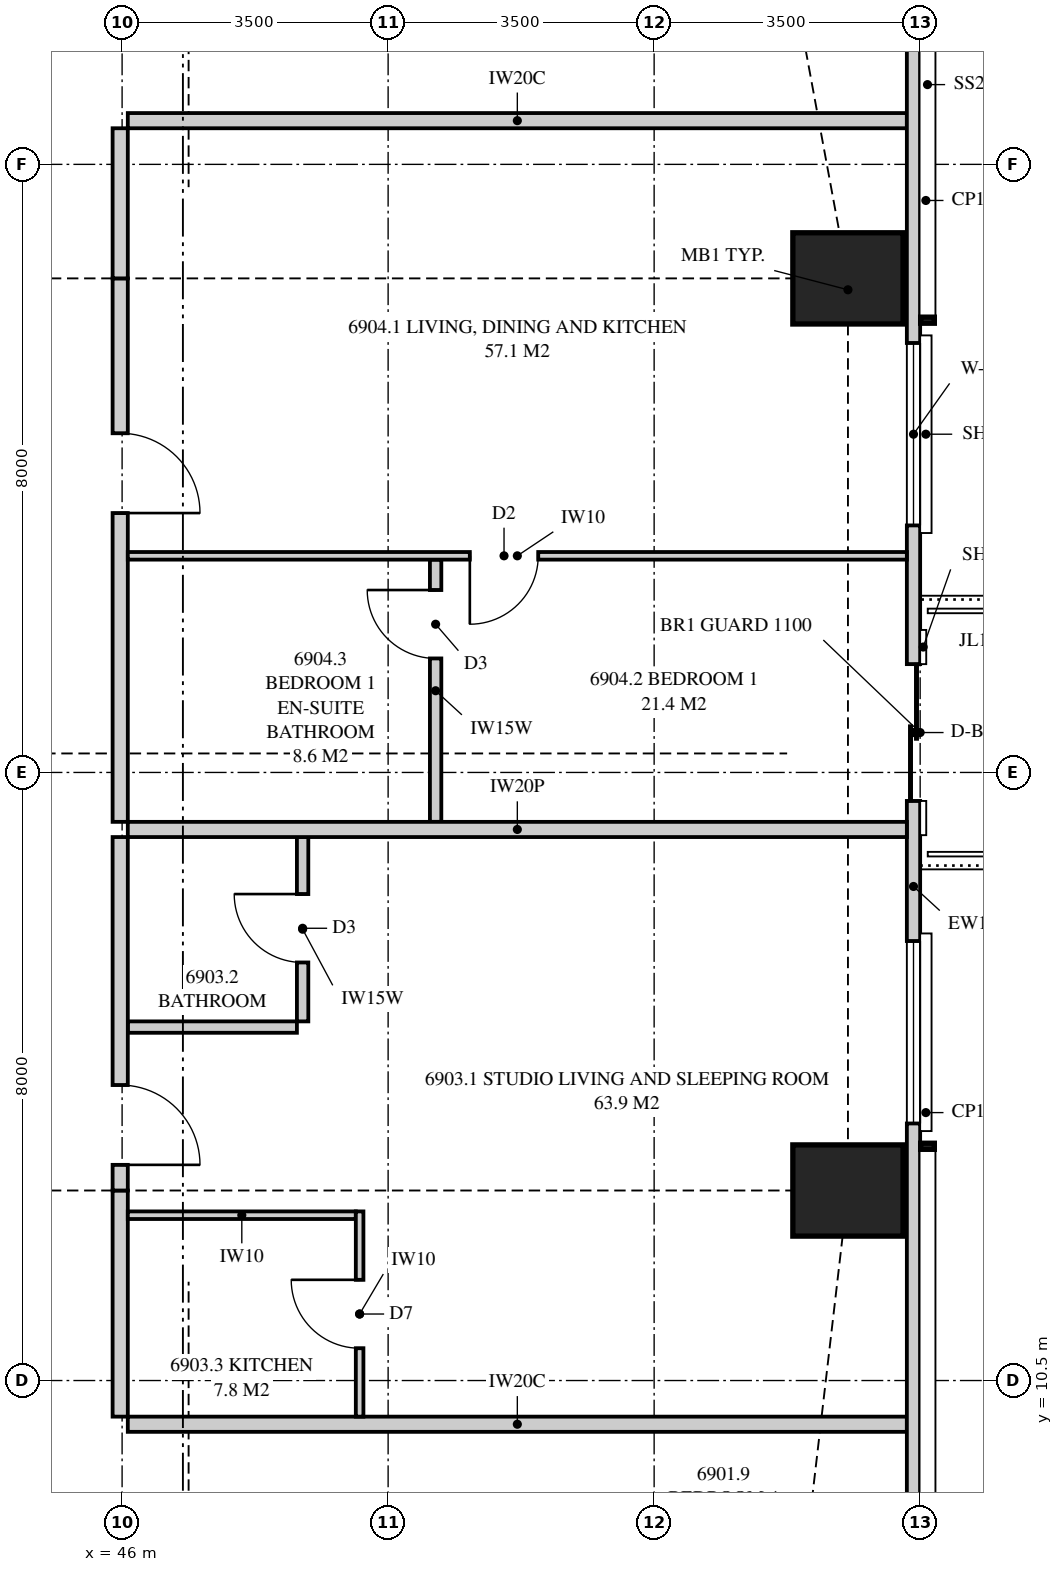
"""IFC4 building model, lengths in metres.
Left out: names, types, materials, properties, quantities, classifications, styles, units other than length and angle.
Written with IfcOpenShell. Run it as: python <this file> out.ifc"""

import sys

from ifc_helpers import new_model, si_unit, direction, frame, frame_2d, origin, origin_2d, place, context, subcontext, project, spatial, polyline, rectangle, outline, extrude, element, fill, save


model = new_model("IFC4")
c1 = context("Model", 3, precision=1e-05, world=origin(), true_north=direction((0.0, 1.0)))
c2 = subcontext(c1, "Body", "Model", "MODEL_VIEW")
j1 = project(units=[si_unit("LENGTHUNIT", "METRE"), si_unit("PLANEANGLEUNIT", "RADIAN")], contexts=[c1])
p1 = place(None, origin())
s1 = spatial("IfcSite", under=j1, at=p1, CompositionType="ELEMENT")
p2 = place(p1, origin())
s2 = spatial("IfcBuilding", under=s1, at=p2, CompositionType="ELEMENT")
p3 = place(p2, frame((0.0, 0.0, 252.95)))
s3 = spatial("IfcBuildingStorey", under=s2, at=p3, CompositionType="ELEMENT", Elevation=252.95)
for number, where, z_axis, x_axis in (
    (1, (55.55, 13.0, 0.0), (0.0, 0.0, 1.0), (1.0, 0.0, 0.0)),
    (2, (55.55, 25.0, 0.0), (0.0, 0.0, 1.0), (1.0, 0.0, 0.0)),
):
    element("IfcColumn", number, at=place(p3, frame(where, z_axis=z_axis, x_axis=x_axis)), inside=s3, PredefinedType="COLUMN", context=c2, shape_type="SweptSolid", body=[
        extrude(rectangle(XDim=1.45, YDim=1.2, at=origin_2d()), origin(), (0.0, 0.0, 1.0), 3.5),
    ])
p4 = place(p3, frame((56.413, 3.051, 0.0), z_axis=(0.0, 0.0, 1.0), x_axis=(0.0, 1.0, 0.0)))
e3 = element("IfcWall", 3, at=p4, inside=s3, PredefinedType="SOLIDWALL", context=c2, shape_type="SweptSolid", body=[
    extrude(outline(polyline([(0.0, 0.0), (27.897, 0.0), (27.897, 3.26), (22.157, 3.26), (22.157, 2.3), (22.092, 2.3), (22.092, 3.26), (21.949, 3.26), (21.949, 2.3), (9.949, 2.3), (9.949, 3.26), (9.858, 3.26), (9.858, 2.3), (9.688, 2.3), (9.688, 3.26), (0.0, 3.26), (0.0, 0.0)])), frame((0.0, 0.087, 0.0), z_axis=(0.0, -1.0, 0.0), x_axis=(1.0, 0.0, 0.0)), (0.0, 0.0, 1.0), 0.175),
])
p5 = place(p4, frame((10.831, 0.0, 0.4)))
e4 = element("IfcOpeningElement", 4, at=p5, cuts=e3, PredefinedType="OPENING", context=c2, shape_type="SweptSolid", body=[
    extrude(rectangle(XDim=2.4, YDim=1.85, at=frame_2d((1.2, 0.925))), frame((0.0, 0.097, 0.0), z_axis=(0.0, -1.0, 0.0), x_axis=(1.0, 0.0, 0.0)), (0.0, 0.0, 1.0), 0.195),
])
p6 = place(p4, frame((15.074, 0.0, 0.0)))
e5 = element("IfcOpeningElement", 5, at=p6, cuts=e3, PredefinedType="OPENING", context=c2, shape_type="SweptSolid", body=[
    extrude(rectangle(XDim=1.8, YDim=2.25, at=frame_2d((0.9, 1.125))), frame((0.0, 0.097, 0.0), z_axis=(0.0, -1.0, 0.0), x_axis=(1.0, 0.0, 0.0)), (0.0, 0.0, 1.0), 0.195),
])
p7 = place(p4, frame((18.699, 0.0, 0.4)))
e6 = element("IfcOpeningElement", 6, at=p7, cuts=e3, PredefinedType="OPENING", context=c2, shape_type="SweptSolid", body=[
    extrude(rectangle(XDim=2.4, YDim=1.85, at=frame_2d((1.2, 0.925))), frame((0.0, 0.097, 0.0), z_axis=(0.0, -1.0, 0.0), x_axis=(1.0, 0.0, 0.0)), (0.0, 0.0, 1.0), 0.195),
])
p8 = place(p3, frame((46.075, 9.925, 0.0), z_axis=(0.0, 0.0, 1.0), x_axis=(1.0, 0.0, 0.0)))
e7 = element("IfcWall", 7, at=p8, inside=s3, PredefinedType="PARTITIONING", context=c2, shape_type="SweptSolid", body=[
    extrude(outline(polyline([(0.0, 0.0), (10.25, 0.0), (10.25, 3.26), (10.033, 3.26), (10.033, 2.3), (8.201, 2.3), (8.201, 3.26), (2.11, 3.26), (2.11, 2.66), (0.0, 2.66), (0.0, 3.26), (0.0, 0.0)])), frame((0.0, 0.1, 0.0), z_axis=(0.0, -1.0, 0.0), x_axis=(1.0, 0.0, 0.0)), (0.0, 0.0, 1.0), 0.2),
])
p9 = place(p3, frame((46.075, 27.075, 0.0), z_axis=(0.0, 0.0, 1.0), x_axis=(1.0, 0.0, 0.0)))
e8 = element("IfcWall", 8, at=p9, inside=s3, PredefinedType="PARTITIONING", context=c2, shape_type="SweptSolid", body=[
    extrude(outline(polyline([(0.0, 0.0), (10.25, 0.0), (10.25, 3.26), (10.017, 3.26), (10.017, 2.3), (8.166, 2.3), (8.166, 3.26), (2.11, 3.26), (2.11, 2.66), (0.0, 2.66), (0.0, 3.26), (0.0, 0.0)])), frame((0.0, 0.1, 0.0), z_axis=(0.0, -1.0, 0.0), x_axis=(1.0, 0.0, 0.0)), (0.0, 0.0, 1.0), 0.2),
])
p10 = place(p3, frame((56.325, 17.75, 0.0), z_axis=(0.0, 0.0, 1.0), x_axis=(-1.0, 0.0, 0.0)))
e9 = element("IfcWall", 9, at=p10, inside=s3, PredefinedType="PARTITIONING", context=c2, shape_type="SweptSolid", body=[
    extrude(outline(polyline([(0.0, 0.0), (10.25, 0.0), (10.25, 3.26), (10.25, 2.66), (1.685, 2.66), (1.685, 2.3), (0.0, 2.3), (0.0, 3.26), (0.0, 0.0)])), frame((0.0, 0.1, 0.0), z_axis=(0.0, -1.0, 0.0), x_axis=(1.0, 0.0, 0.0)), (0.0, 0.0, 1.0), 0.2),
])
p11 = place(p3, frame((45.975, 10.025, 0.0), z_axis=(0.0, 0.0, 1.0), x_axis=(0.0, 1.0, 0.0)))
e10 = element("IfcWall", 10, at=p11, inside=s3, PredefinedType="PARTITIONING", context=c2, shape_type="SweptSolid", body=[
    extrude(rectangle(XDim=2.975, YDim=0.2, at=frame_2d((1.488, 0.0))), origin(), (0.0, 0.0, 1.0), 2.66),
])
p12 = place(p3, frame((45.975, 13.0, 0.0), z_axis=(0.0, 0.0, 1.0), x_axis=(0.0, 1.0, 0.0)))
e11 = element("IfcWall", 11, at=p12, inside=s3, PredefinedType="PARTITIONING", context=c2, shape_type="SweptSolid", body=[
    extrude(outline(polyline([(0.0, 0.0), (4.65, 0.0), (4.65, 2.66), (4.44, 2.66), (4.44, 3.26), (1.31, 3.26), (1.31, 2.66), (0.0, 2.66), (0.0, 0.0)])), frame((0.0, 0.1, 0.0), z_axis=(0.0, -1.0, 0.0), x_axis=(1.0, 0.0, 0.0)), (0.0, 0.0, 1.0), 0.2),
])
p13 = place(p12, frame((0.337, 0.0, 0.0)))
e12 = element("IfcOpeningElement", 12, at=p13, cuts=e11, PredefinedType="OPENING", context=c2, shape_type="SweptSolid", body=[
    extrude(rectangle(XDim=1.05, YDim=2.2, at=frame_2d((0.525, 1.1))), frame((0.0, 0.11, 0.0), z_axis=(0.0, -1.0, 0.0), x_axis=(1.0, 0.0, 0.0)), (0.0, 0.0, 1.0), 0.22),
])
p14 = place(p3, frame((48.375, 15.225, 0.0), z_axis=(0.0, 0.0, 1.0), x_axis=(0.0, 1.0, 0.0)))
e13 = element("IfcWall", 13, at=p14, inside=s3, PredefinedType="PLUMBINGWALL", context=c2, shape_type="SweptSolid", body=[
    extrude(outline(polyline([(0.0, 0.0), (2.425, 0.0), (2.425, 3.26), (2.425, 2.66), (2.24, 2.66), (2.24, 3.26), (0.0, 3.26), (0.0, 0.0)])), frame((0.0, 0.075, 0.0), z_axis=(0.0, -1.0, 0.0), x_axis=(1.0, 0.0, 0.0)), (0.0, 0.0, 1.0), 0.15),
])
p15 = place(p14, frame((0.775, 0.0, 0.0)))
e14 = element("IfcOpeningElement", 14, at=p15, cuts=e13, PredefinedType="OPENING", context=c2, shape_type="SweptSolid", body=[
    extrude(rectangle(XDim=0.9, YDim=2.1, at=frame_2d((0.45, 1.05))), frame((0.0, 0.085, 0.0), z_axis=(0.0, -1.0, 0.0), x_axis=(1.0, 0.0, 0.0)), (0.0, 0.0, 1.0), 0.17),
])
p16 = place(p3, frame((48.3, 15.15, 0.0), z_axis=(0.0, 0.0, 1.0), x_axis=(-1.0, 0.0, 0.0)))
e15 = element("IfcWall", 15, at=p16, inside=s3, PredefinedType="PLUMBINGWALL", context=c2, shape_type="SweptSolid", body=[
    extrude(rectangle(XDim=2.225, YDim=0.15, at=frame_2d((1.113, 0.0))), origin(), (0.0, 0.0, 1.0), 3.26),
])
p17 = place(p3, frame((45.975, 17.85, 0.0), z_axis=(0.0, 0.0, 1.0), x_axis=(0.0, 1.0, 0.0)))
e16 = element("IfcWall", 16, at=p17, inside=s3, PredefinedType="PARTITIONING", context=c2, shape_type="SweptSolid", body=[
    extrude(outline(polyline([(0.0, 0.0), (7.15, 0.0), (7.15, 2.66), (5.84, 2.66), (5.84, 3.26), (2.21, 3.26), (2.21, 2.66), (0.0, 2.66), (0.0, 0.0)])), frame((0.0, 0.1, 0.0), z_axis=(0.0, -1.0, 0.0), x_axis=(1.0, 0.0, 0.0)), (0.0, 0.0, 1.0), 0.2),
])
p18 = place(p17, frame((4.062, 0.0, 0.0)))
e17 = element("IfcOpeningElement", 17, at=p18, cuts=e16, PredefinedType="OPENING", context=c2, shape_type="SweptSolid", body=[
    extrude(rectangle(XDim=1.05, YDim=2.2, at=frame_2d((0.525, 1.1))), frame((0.0, 0.11, 0.0), z_axis=(0.0, -1.0, 0.0), x_axis=(1.0, 0.0, 0.0)), (0.0, 0.0, 1.0), 0.22),
])
p19 = place(p3, frame((45.975, 25.0, 0.0), z_axis=(0.0, 0.0, 1.0), x_axis=(0.0, 1.0, 0.0)))
e18 = element("IfcWall", 18, at=p19, inside=s3, PredefinedType="PARTITIONING", context=c2, shape_type="SweptSolid", body=[
    extrude(rectangle(XDim=1.975, YDim=0.2, at=frame_2d((0.988, 0.0))), origin(), (0.0, 0.0, 1.0), 2.66),
])
p20 = place(p3, frame((56.325, 21.35, 0.0), z_axis=(0.0, 0.0, 1.0), x_axis=(-1.0, 0.0, 0.0)))
e19 = element("IfcWall", 19, at=p20, inside=s3, PredefinedType="PARTITIONING", context=c2, shape_type="SweptSolid", body=[
    extrude(outline(polyline([(0.0, 0.0), (10.25, 0.0), (10.25, 3.26), (1.635, 3.26), (1.635, 2.3), (0.0, 2.3), (0.0, 3.26), (0.0, 0.0)])), frame((0.0, 0.05, 0.0), z_axis=(0.0, -1.0, 0.0), x_axis=(1.0, 0.0, 0.0)), (0.0, 0.0, 1.0), 0.1),
])
p21 = place(p20, frame((4.85, 0.0, 0.0)))
e20 = element("IfcOpeningElement", 20, at=p21, cuts=e19, PredefinedType="OPENING", context=c2, shape_type="SweptSolid", body=[
    extrude(rectangle(XDim=0.9, YDim=2.1, at=frame_2d((0.45, 1.05))), frame((0.0, 0.06, 0.0), z_axis=(0.0, -1.0, 0.0), x_axis=(1.0, 0.0, 0.0)), (0.0, 0.0, 1.0), 0.12),
])
p22 = place(p3, frame((50.125, 17.85, 0.0), z_axis=(0.0, 0.0, 1.0), x_axis=(0.0, 1.0, 0.0)))
e21 = element("IfcWall", 21, at=p22, inside=s3, PredefinedType="PLUMBINGWALL", context=c2, shape_type="SweptSolid", body=[
    extrude(outline(polyline([(0.0, 0.0), (3.45, 0.0), (3.45, 3.26), (2.185, 3.26), (2.185, 2.66), (0.0, 2.66), (0.0, 3.26), (0.0, 0.0)])), frame((0.0, 0.075, 0.0), z_axis=(0.0, -1.0, 0.0), x_axis=(1.0, 0.0, 0.0)), (0.0, 0.0, 1.0), 0.15),
])
p23 = place(p22, frame((2.15, 0.0, 0.0)))
e22 = element("IfcOpeningElement", 22, at=p23, cuts=e21, PredefinedType="OPENING", context=c2, shape_type="SweptSolid", body=[
    extrude(rectangle(XDim=0.9, YDim=2.1, at=frame_2d((0.45, 1.05))), frame((0.0, 0.085, 0.0), z_axis=(0.0, -1.0, 0.0), x_axis=(1.0, 0.0, 0.0)), (0.0, 0.0, 1.0), 0.17),
])
p24 = place(p3, frame((49.125, 10.025, 0.0), z_axis=(0.0, 0.0, 1.0), x_axis=(0.0, 1.0, 0.0)))
e23 = element("IfcWall", 23, at=p24, inside=s3, PredefinedType="PARTITIONING", context=c2, shape_type="SweptSolid", body=[
    extrude(outline(polyline([(0.0, 0.0), (2.7, 0.0), (2.7, 3.26), (2.7, 2.66), (1.715, 2.66), (1.715, 3.26), (0.0, 3.26), (0.0, 0.0)])), frame((0.0, 0.05, 0.0), z_axis=(0.0, -1.0, 0.0), x_axis=(1.0, 0.0, 0.0)), (0.0, 0.0, 1.0), 0.1),
])
p25 = place(p24, frame((0.9, 0.0, 0.0)))
e24 = element("IfcOpeningElement", 24, at=p25, cuts=e23, PredefinedType="OPENING", context=c2, shape_type="SweptSolid", body=[
    extrude(rectangle(XDim=0.9, YDim=2.1, at=frame_2d((0.45, 1.05))), frame((0.0, 0.06, 0.0), z_axis=(0.0, -1.0, 0.0), x_axis=(1.0, 0.0, 0.0)), (0.0, 0.0, 1.0), 0.12),
])
p26 = place(p3, frame((46.075, 12.675, 0.0), z_axis=(0.0, 0.0, 1.0), x_axis=(1.0, 0.0, 0.0)))
e25 = element("IfcWall", 25, at=p26, inside=s3, PredefinedType="PARTITIONING", context=c2, shape_type="SweptSolid", body=[
    extrude(outline(polyline([(0.0, 0.0), (3.0, 0.0), (3.0, 3.26), (3.0, 2.66), (2.06, 2.66), (0.0, 2.66), (0.0, 3.26), (0.0, 0.0)])), frame((0.0, 0.05, 0.0), z_axis=(0.0, -1.0, 0.0), x_axis=(1.0, 0.0, 0.0)), (0.0, 0.0, 1.0), 0.1),
])
p27 = place(p5, origin())
e26 = element("IfcWindow", 26, at=p27, inside=s3, PartitioningType="SINGLE_PANEL", PredefinedType="WINDOW", context=c2, shape_type="SweptSolid", body=[
    extrude(rectangle(XDim=2.4, YDim=1.85, at=frame_2d((1.2, 0.925))), frame((0.0, 0.03, 0.0), z_axis=(0.0, -1.0, 0.0), x_axis=(1.0, 0.0, 0.0)), (0.0, 0.0, 1.0), 0.06),
])
fill(e4, e26)
p28 = place(p6, origin())
e27 = element("IfcDoor", 27, at=p28, inside=s3, OperationType="SLIDING_TO_LEFT", PredefinedType="DOOR", context=c2, shape_type="SweptSolid", body=[
    extrude(rectangle(XDim=1.8, YDim=2.25, at=frame_2d((0.9, 1.125))), frame((0.0, 0.025, 0.0), z_axis=(0.0, -1.0, 0.0), x_axis=(1.0, 0.0, 0.0)), (0.0, 0.0, 1.0), 0.05),
])
fill(e5, e27)
p29 = place(p7, origin())
e28 = element("IfcWindow", 28, at=p29, inside=s3, PartitioningType="SINGLE_PANEL", PredefinedType="WINDOW", context=c2, shape_type="SweptSolid", body=[
    extrude(rectangle(XDim=2.4, YDim=1.85, at=frame_2d((1.2, 0.925))), frame((0.0, 0.03, 0.0), z_axis=(0.0, -1.0, 0.0), x_axis=(1.0, 0.0, 0.0)), (0.0, 0.0, 1.0), 0.06),
])
fill(e6, e28)
p30 = place(p13, frame((1.05, 0.0, 0.0), z_axis=(0.0, 0.0, 1.0), x_axis=(-1.0, 0.0, 0.0)))
e29 = element("IfcDoor", 29, at=p30, inside=s3, OperationType="SINGLE_SWING_RIGHT", PredefinedType="DOOR", context=c2, shape_type="SweptSolid", body=[
    extrude(rectangle(XDim=1.05, YDim=2.2, at=frame_2d((0.525, 1.1))), frame((0.0, 0.025, 0.0), z_axis=(0.0, -1.0, 0.0), x_axis=(1.0, 0.0, 0.0)), (0.0, 0.0, 1.0), 0.05),
])
fill(e12, e29)
p31 = place(p15, origin())
e30 = element("IfcDoor", 30, at=p31, inside=s3, OperationType="SINGLE_SWING_RIGHT", PredefinedType="DOOR", context=c2, shape_type="SweptSolid", body=[
    extrude(rectangle(XDim=0.9, YDim=2.1, at=frame_2d((0.45, 1.05))), frame((0.0, 0.025, 0.0), z_axis=(0.0, -1.0, 0.0), x_axis=(1.0, 0.0, 0.0)), (0.0, 0.0, 1.0), 0.05),
])
fill(e14, e30)
p32 = place(p18, frame((1.05, 0.0, 0.0), z_axis=(0.0, 0.0, 1.0), x_axis=(-1.0, 0.0, 0.0)))
e31 = element("IfcDoor", 31, at=p32, inside=s3, OperationType="SINGLE_SWING_RIGHT", PredefinedType="DOOR", context=c2, shape_type="SweptSolid", body=[
    extrude(rectangle(XDim=1.05, YDim=2.2, at=frame_2d((0.525, 1.1))), frame((0.0, 0.025, 0.0), z_axis=(0.0, -1.0, 0.0), x_axis=(1.0, 0.0, 0.0)), (0.0, 0.0, 1.0), 0.05),
])
fill(e17, e31)
p33 = place(p21, origin())
e32 = element("IfcDoor", 32, at=p33, inside=s3, OperationType="SINGLE_SWING_RIGHT", PredefinedType="DOOR", context=c2, shape_type="SweptSolid", body=[
    extrude(rectangle(XDim=0.9, YDim=2.1, at=frame_2d((0.45, 1.05))), frame((0.0, 0.025, 0.0), z_axis=(0.0, -1.0, 0.0), x_axis=(1.0, 0.0, 0.0)), (0.0, 0.0, 1.0), 0.05),
])
fill(e20, e32)
p34 = place(p23, origin())
e33 = element("IfcDoor", 33, at=p34, inside=s3, OperationType="SINGLE_SWING_RIGHT", PredefinedType="DOOR", context=c2, shape_type="SweptSolid", body=[
    extrude(rectangle(XDim=0.9, YDim=2.1, at=frame_2d((0.45, 1.05))), frame((0.0, 0.025, 0.0), z_axis=(0.0, -1.0, 0.0), x_axis=(1.0, 0.0, 0.0)), (0.0, 0.0, 1.0), 0.05),
])
fill(e22, e33)
p35 = place(p25, origin())
e34 = element("IfcDoor", 34, at=p35, inside=s3, OperationType="SINGLE_SWING_RIGHT", PredefinedType="DOOR", context=c2, shape_type="SweptSolid", body=[
    extrude(rectangle(XDim=0.9, YDim=2.1, at=frame_2d((0.45, 1.05))), frame((0.0, 0.025, 0.0), z_axis=(0.0, -1.0, 0.0), x_axis=(1.0, 0.0, 0.0)), (0.0, 0.0, 1.0), 0.05),
])
fill(e24, e34)
save(model, sys.argv[1])
